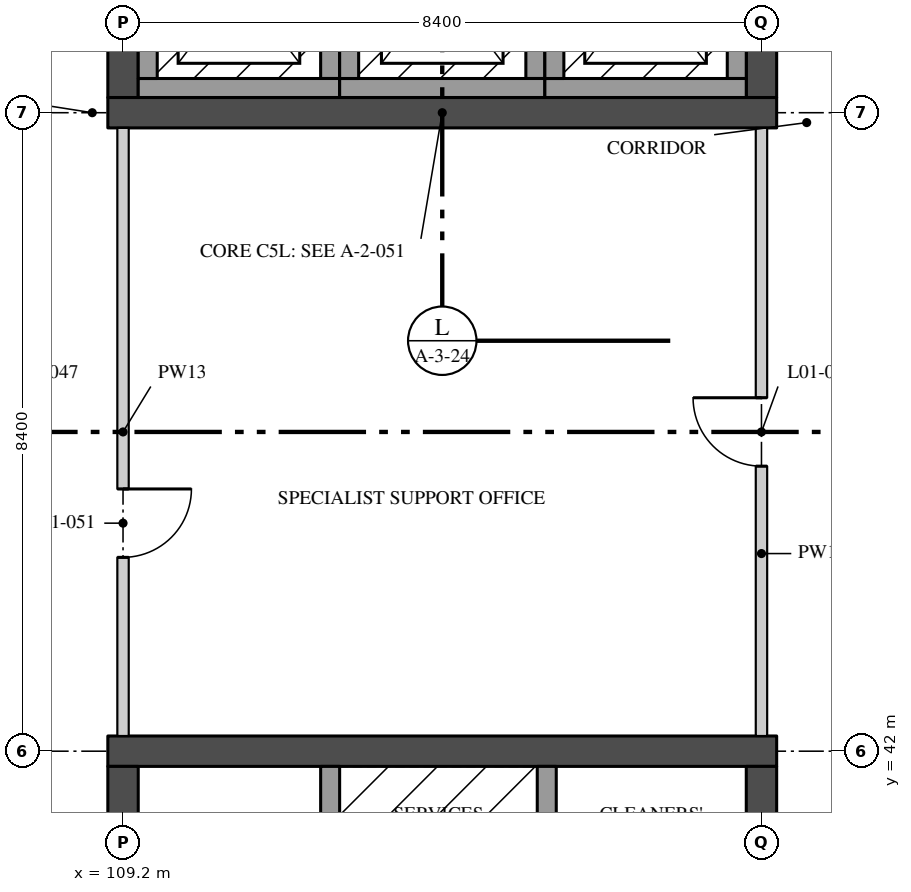
"""IFC4 building model, lengths in metres.
Left out: names, types, materials, properties, quantities, classifications, styles, units other than length and angle.
Written with IfcOpenShell. Run it as: python <this file> out.ifc"""

import sys

from ifc_helpers import new_model, si_unit, direction, frame, frame_2d, origin, place, context, subcontext, project, spatial, rectangle, extrude, element, fill, save


model = new_model("IFC4")
c1 = context("Model", 3, precision=1e-05, world=origin(), true_north=direction((0.0, 1.0)))
c2 = subcontext(c1, "Body", "Model", "MODEL_VIEW")
j1 = project(units=[si_unit("LENGTHUNIT", "METRE"), si_unit("PLANEANGLEUNIT", "RADIAN")], contexts=[c1])
p1 = place(None, origin())
s1 = spatial("IfcSite", under=j1, at=p1, CompositionType="ELEMENT")
p2 = place(p1, origin())
s2 = spatial("IfcBuilding", under=s1, at=p2, CompositionType="ELEMENT")
p3 = place(p2, frame((0.0, 0.0, 5.4)))
s3 = spatial("IfcBuildingStorey", under=s2, at=p3, CompositionType="ELEMENT", Elevation=5.4)
p4 = place(p3, frame((109.0, 50.4, 0.0), z_axis=(0.0, 0.0, 1.0), x_axis=(1.0, 0.0, 0.0)))
e1 = element("IfcWall", 1, at=p4, inside=s3, PredefinedType="SHEAR", context=c2, shape_type="SweptSolid", body=[
    extrude(rectangle(XDim=8.8, YDim=0.4, at=frame_2d((4.4, 0.0))), origin(), (0.0, 0.0, 1.0), 4.37),
])
p5 = place(p3, frame((109.2, 50.6, 0.0), z_axis=(0.0, 0.0, 1.0), x_axis=(0.0, 1.0, 0.0)))
e2 = element("IfcWall", 2, at=p5, inside=s3, PredefinedType="SHEAR", context=c2, shape_type="SweptSolid", body=[
    extrude(rectangle(XDim=8.0, YDim=0.4, at=frame_2d((4.0, 0.0))), origin(), (0.0, 0.0, 1.0), 4.37),
])
p6 = place(p5, frame((3.25, 0.0, 0.0)))
e3 = element("IfcOpeningElement", 3, at=p6, cuts=e2, PredefinedType="OPENING", context=c2, shape_type="SweptSolid", body=[
    extrude(rectangle(XDim=1.2, YDim=2.1, at=frame_2d((0.6, 1.05))), frame((0.0, 0.21, 0.0), z_axis=(0.0, -1.0, 0.0), x_axis=(1.0, 0.0, 0.0)), (0.0, 0.0, 1.0), 0.42),
])
p7 = place(p3, frame((117.6, 50.6, 0.0), z_axis=(0.0, 0.0, 1.0), x_axis=(0.0, 1.0, 0.0)))
e4 = element("IfcWall", 4, at=p7, inside=s3, PredefinedType="SHEAR", context=c2, shape_type="SweptSolid", body=[
    extrude(rectangle(XDim=8.0, YDim=0.4, at=frame_2d((4.0, 0.0))), origin(), (0.0, 0.0, 1.0), 4.37),
])
p8 = place(p7, frame((3.25, 0.0, 0.0)))
e5 = element("IfcOpeningElement", 5, at=p8, cuts=e4, PredefinedType="OPENING", context=c2, shape_type="SweptSolid", body=[
    extrude(rectangle(XDim=1.2, YDim=2.1, at=frame_2d((0.6, 1.05))), frame((0.0, 0.21, 0.0), z_axis=(0.0, -1.0, 0.0), x_axis=(1.0, 0.0, 0.0)), (0.0, 0.0, 1.0), 0.42),
])
p9 = place(p7, frame((6.0, 0.0, 0.0)))
e6 = element("IfcOpeningElement", 6, at=p9, cuts=e4, PredefinedType="OPENING", context=c2, shape_type="SweptSolid", body=[
    extrude(rectangle(XDim=1.2, YDim=2.1, at=frame_2d((0.6, 1.05))), frame((0.0, 0.21, 0.0), z_axis=(0.0, -1.0, 0.0), x_axis=(1.0, 0.0, 0.0)), (0.0, 0.0, 1.0), 0.42),
])
p10 = place(p3, frame((109.0, 42.0, 0.0), z_axis=(0.0, 0.0, 1.0), x_axis=(1.0, 0.0, 0.0)))
e7 = element("IfcWall", 7, at=p10, inside=s3, PredefinedType="SHEAR", context=c2, shape_type="SweptSolid", body=[
    extrude(rectangle(XDim=8.8, YDim=0.4, at=frame_2d((4.4, 0.0))), origin(), (0.0, 0.0, 1.0), 4.37),
])
p11 = place(p3, frame((109.2, 33.8, 0.0), z_axis=(0.0, 0.0, 1.0), x_axis=(0.0, 1.0, 0.0)))
e8 = element("IfcWall", 8, at=p11, inside=s3, PredefinedType="SHEAR", context=c2, shape_type="SweptSolid", body=[
    extrude(rectangle(XDim=8.0, YDim=0.4, at=frame_2d((4.0, 0.0))), origin(), (0.0, 0.0, 1.0), 4.37),
])
p12 = place(p11, frame((3.875, 0.0, 0.0)))
e9 = element("IfcOpeningElement", 9, at=p12, cuts=e8, PredefinedType="OPENING", context=c2, shape_type="SweptSolid", body=[
    extrude(rectangle(XDim=1.2, YDim=2.1, at=frame_2d((0.6, 1.05))), frame((0.0, 0.21, 0.0), z_axis=(0.0, -1.0, 0.0), x_axis=(1.0, 0.0, 0.0)), (0.0, 0.0, 1.0), 0.42),
])
p13 = place(p3, frame((117.6, 33.8, 0.0), z_axis=(0.0, 0.0, 1.0), x_axis=(0.0, 1.0, 0.0)))
e10 = element("IfcWall", 10, at=p13, inside=s3, PredefinedType="SHEAR", context=c2, shape_type="SweptSolid", body=[
    extrude(rectangle(XDim=8.0, YDim=0.4, at=frame_2d((4.0, 0.0))), origin(), (0.0, 0.0, 1.0), 4.37),
])
p14 = place(p13, frame((3.875, 0.0, 0.0)))
e11 = element("IfcOpeningElement", 11, at=p14, cuts=e10, PredefinedType="OPENING", context=c2, shape_type="SweptSolid", body=[
    extrude(rectangle(XDim=1.2, YDim=2.1, at=frame_2d((0.6, 1.05))), frame((0.0, 0.21, 0.0), z_axis=(0.0, -1.0, 0.0), x_axis=(1.0, 0.0, 0.0)), (0.0, 0.0, 1.0), 0.42),
])
p15 = place(p3, frame((111.925, 39.0, 0.0), z_axis=(0.0, 0.0, 1.0), x_axis=(0.0, 1.0, 0.0)))
e12 = element("IfcWall", 12, at=p15, inside=s3, PredefinedType="SOLIDWALL", context=c2, shape_type="SweptSolid", body=[
    extrude(rectangle(XDim=2.8, YDim=0.25, at=frame_2d((1.4, 0.0))), origin(), (0.0, 0.0, 1.0), 4.37),
])
p16 = place(p3, frame((114.775, 39.25, 0.0), z_axis=(0.0, 0.0, 1.0), x_axis=(0.0, 1.0, 0.0)))
e13 = element("IfcWall", 13, at=p16, inside=s3, PredefinedType="SOLIDWALL", context=c2, shape_type="SweptSolid", body=[
    extrude(rectangle(XDim=2.55, YDim=0.25, at=frame_2d((1.275, 0.0))), origin(), (0.0, 0.0, 1.0), 4.37),
])
p17 = place(p3, frame((111.925, 50.85, 0.0), z_axis=(0.0, 0.0, 1.0), x_axis=(0.0, 1.0, 0.0)))
e14 = element("IfcWall", 14, at=p17, inside=s3, PredefinedType="SOLIDWALL", context=c2, shape_type="SweptSolid", body=[
    extrude(rectangle(XDim=2.3, YDim=0.25, at=frame_2d((1.15, 0.0))), origin(), (0.0, 0.0, 1.0), 4.37),
])
p18 = place(p3, frame((109.4, 50.725, 0.0), z_axis=(0.0, 0.0, 1.0), x_axis=(1.0, 0.0, 0.0)))
e15 = element("IfcWall", 15, at=p18, inside=s3, PredefinedType="SOLIDWALL", context=c2, shape_type="SweptSolid", body=[
    extrude(rectangle(XDim=2.65, YDim=0.25, at=frame_2d((1.325, 0.0))), origin(), (0.0, 0.0, 1.0), 4.37),
])
for number, where, z_axis, x_axis in (
    (16, (109.525, 50.85, 0.0), (0.0, 0.0, 1.0), (0.0, 1.0, 0.0)),
    (17, (114.625, 50.85, 0.0), (0.0, 0.0, 1.0), (0.0, 1.0, 0.0)),
):
    element("IfcWall", number, at=place(p3, frame(where, z_axis=z_axis, x_axis=x_axis)), inside=s3, PredefinedType="SOLIDWALL", context=c2, shape_type="SweptSolid", body=[
        extrude(rectangle(XDim=2.3, YDim=0.25, at=frame_2d((1.15, 0.0))), origin(), (0.0, 0.0, 1.0), 4.37),
    ])
p19 = place(p3, frame((112.05, 50.725, 0.0), z_axis=(0.0, 0.0, 1.0), x_axis=(1.0, 0.0, 0.0)))
e18 = element("IfcWall", 18, at=p19, inside=s3, PredefinedType="SOLIDWALL", context=c2, shape_type="SweptSolid", body=[
    extrude(rectangle(XDim=2.7, YDim=0.25, at=frame_2d((1.35, 0.0))), origin(), (0.0, 0.0, 1.0), 4.37),
])
for number, where, z_axis, x_axis in (
    (19, (112.175, 50.85, 0.0), (0.0, 0.0, 1.0), (0.0, 1.0, 0.0)),
    (20, (117.275, 50.85, 0.0), (0.0, 0.0, 1.0), (0.0, 1.0, 0.0)),
):
    element("IfcWall", number, at=place(p3, frame(where, z_axis=z_axis, x_axis=x_axis)), inside=s3, PredefinedType="SOLIDWALL", context=c2, shape_type="SweptSolid", body=[
        extrude(rectangle(XDim=2.3, YDim=0.25, at=frame_2d((1.15, 0.0))), origin(), (0.0, 0.0, 1.0), 4.37),
    ])
p20 = place(p3, frame((114.75, 50.725, 0.0), z_axis=(0.0, 0.0, 1.0), x_axis=(1.0, 0.0, 0.0)))
e21 = element("IfcWall", 21, at=p20, inside=s3, PredefinedType="SOLIDWALL", context=c2, shape_type="SweptSolid", body=[
    extrude(rectangle(XDim=2.65, YDim=0.25, at=frame_2d((1.325, 0.0))), origin(), (0.0, 0.0, 1.0), 4.37),
])
p21 = place(p3, frame((114.875, 50.85, 0.0), z_axis=(0.0, 0.0, 1.0), x_axis=(0.0, 1.0, 0.0)))
e22 = element("IfcWall", 22, at=p21, inside=s3, PredefinedType="SOLIDWALL", context=c2, shape_type="SweptSolid", body=[
    extrude(rectangle(XDim=2.3, YDim=0.25, at=frame_2d((1.15, 0.0))), origin(), (0.0, 0.0, 1.0), 4.37),
])
p22 = place(p3, frame((117.6, 42.2, 0.0), z_axis=(0.0, 0.0, 1.0), x_axis=(0.0, 1.0, 0.0)))
e23 = element("IfcWall", 23, at=p22, inside=s3, PredefinedType="PARTITIONING", context=c2, shape_type="SweptSolid", body=[
    extrude(rectangle(XDim=8.0, YDim=0.15, at=frame_2d((4.0, 0.0))), origin(), (0.0, 0.0, 1.0), 3.746),
])
p23 = place(p22, frame((3.55, 0.0, 0.0)))
e24 = element("IfcOpeningElement", 24, at=p23, cuts=e23, PredefinedType="OPENING", context=c2, shape_type="SweptSolid", body=[
    extrude(rectangle(XDim=0.9, YDim=2.1, at=frame_2d((0.45, 1.05))), frame((0.0, 0.085, 0.0), z_axis=(0.0, -1.0, 0.0), x_axis=(1.0, 0.0, 0.0)), (0.0, 0.0, 1.0), 0.17),
])
p24 = place(p3, frame((109.2, 42.2, 0.0), z_axis=(0.0, 0.0, 1.0), x_axis=(0.0, 1.0, 0.0)))
e25 = element("IfcWall", 25, at=p24, inside=s3, PredefinedType="PARTITIONING", context=c2, shape_type="SweptSolid", body=[
    extrude(rectangle(XDim=8.0, YDim=0.15, at=frame_2d((4.0, 0.0))), origin(), (0.0, 0.0, 1.0), 3.746),
])
p25 = place(p24, frame((2.35, 0.0, 0.0)))
e26 = element("IfcOpeningElement", 26, at=p25, cuts=e25, PredefinedType="OPENING", context=c2, shape_type="SweptSolid", body=[
    extrude(rectangle(XDim=0.9, YDim=2.1, at=frame_2d((0.45, 1.05))), frame((0.0, 0.085, 0.0), z_axis=(0.0, -1.0, 0.0), x_axis=(1.0, 0.0, 0.0)), (0.0, 0.0, 1.0), 0.17),
])
p26 = place(p23, origin())
e27 = element("IfcDoor", 27, at=p26, inside=s3, OperationType="SINGLE_SWING_LEFT", PredefinedType="DOOR", context=c2, shape_type="SweptSolid", body=[
    extrude(rectangle(XDim=0.9, YDim=2.1, at=frame_2d((0.45, 1.05))), frame((0.0, 0.025, 0.0), z_axis=(0.0, -1.0, 0.0), x_axis=(1.0, 0.0, 0.0)), (0.0, 0.0, 1.0), 0.05),
])
fill(e24, e27)
p27 = place(p25, frame((0.9, 0.0, 0.0), z_axis=(0.0, 0.0, 1.0), x_axis=(-1.0, 0.0, 0.0)))
e28 = element("IfcDoor", 28, at=p27, inside=s3, OperationType="SINGLE_SWING_RIGHT", PredefinedType="DOOR", context=c2, shape_type="SweptSolid", body=[
    extrude(rectangle(XDim=0.9, YDim=2.1, at=frame_2d((0.45, 1.05))), frame((0.0, 0.025, 0.0), z_axis=(0.0, -1.0, 0.0), x_axis=(1.0, 0.0, 0.0)), (0.0, 0.0, 1.0), 0.05),
])
fill(e26, e28)
save(model, sys.argv[1])
